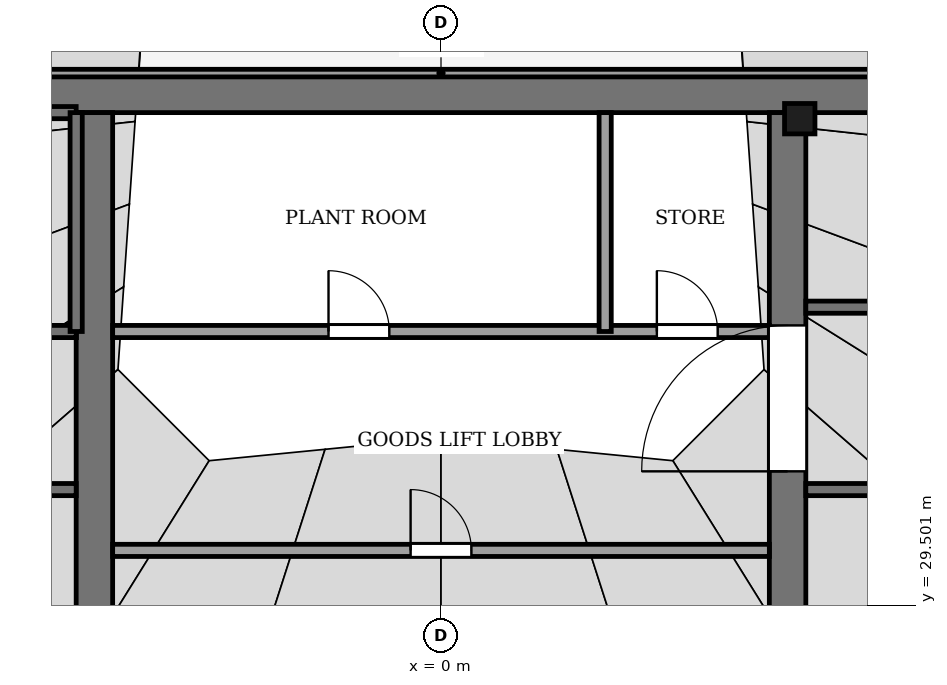
"""IFC4 building model, lengths in metres.
Left out: names, types, materials, properties, quantities, classifications, styles, units other than length and angle.
Written with IfcOpenShell. Run it as: python <this file> out.ifc"""

import sys

from ifc_helpers import new_model, si_unit, direction, frame, frame_2d, origin, origin_2d, place, context, subcontext, project, spatial, rectangle, extrude, element, fill, save


model = new_model("IFC4")
c1 = context("Model", 3, precision=1e-05, world=origin(), true_north=direction((0.0, 1.0)))
c2 = subcontext(c1, "Body", "Model", "MODEL_VIEW")
j1 = project(units=[si_unit("LENGTHUNIT", "METRE"), si_unit("PLANEANGLEUNIT", "RADIAN")], contexts=[c1])
p1 = place(None, origin())
s1 = spatial("IfcSite", under=j1, at=p1, CompositionType="ELEMENT")
p2 = place(p1, origin())
s2 = spatial("IfcBuilding", under=s1, at=p2, CompositionType="ELEMENT")
p3 = place(p2, frame((0.0, 0.0, 368.0)))
s3 = spatial("IfcBuildingStorey", under=s2, at=p3, CompositionType="ELEMENT", Elevation=368.0)
p4 = place(p3, frame((-13.2, 37.9, -0.15), z_axis=(0.0, 0.0, 1.0), x_axis=(1.0, 0.0, 0.0)))
e1 = element("IfcWall", 1, at=p4, inside=s3, PredefinedType="SHEAR", context=c2, shape_type="SweptSolid", body=[
    extrude(rectangle(XDim=26.4, YDim=0.6, at=frame_2d((13.2, 0.0))), origin(), (0.0, 0.0, 1.0), 3.45),
])
p5 = place(p3, frame((-5.7, 18.4, -0.15), z_axis=(0.0, 0.0, 1.0), x_axis=(0.0, 1.0, 0.0)))
e2 = element("IfcWall", 2, at=p5, inside=s3, PredefinedType="SHEAR", context=c2, shape_type="SweptSolid", body=[
    extrude(rectangle(XDim=19.2, YDim=0.6, at=frame_2d((9.6, 0.0))), origin(), (0.0, 0.0, 1.0), 3.45),
])
p6 = place(p5, frame((8.35, 0.0, 0.15)))
e3 = element("IfcOpeningElement", 3, at=p6, cuts=e2, PredefinedType="OPENING", context=c2, shape_type="SweptSolid", body=[
    extrude(rectangle(XDim=0.9, YDim=2.1, at=frame_2d((0.45, 1.05))), frame((0.0, 0.31, 0.0), z_axis=(0.0, -1.0, 0.0), x_axis=(1.0, 0.0, 0.0)), (0.0, 0.0, 1.0), 0.62),
])
p7 = place(p3, frame((5.7, 18.4, -0.15), z_axis=(0.0, 0.0, 1.0), x_axis=(0.0, 1.0, 0.0)))
e4 = element("IfcWall", 4, at=p7, inside=s3, PredefinedType="SHEAR", context=c2, shape_type="SweptSolid", body=[
    extrude(rectangle(XDim=19.2, YDim=0.6, at=frame_2d((9.6, 0.0))), origin(), (0.0, 0.0, 1.0), 3.45),
])
p8 = place(p7, frame((13.3, 0.0, 0.15)))
e5 = element("IfcOpeningElement", 5, at=p8, cuts=e4, PredefinedType="OPENING", context=c2, shape_type="SweptSolid", body=[
    extrude(rectangle(XDim=2.4, YDim=2.4, at=frame_2d((1.2, 1.2))), frame((0.0, 0.31, 0.0), z_axis=(0.0, -1.0, 0.0), x_axis=(1.0, 0.0, 0.0)), (0.0, 0.0, 1.0), 0.62),
])
p9 = place(p3, frame((5.9, 37.5, 3.5), z_axis=(0.0, 0.0, 1.0), x_axis=(1.0, 0.0, 0.0)))
e6 = element("IfcColumn", 6, at=p9, inside=s3, PredefinedType="COLUMN", context=c2, shape_type="SweptSolid", body=[
    extrude(rectangle(XDim=0.5, YDim=0.5, at=origin_2d()), origin(), (0.0, 0.0, 1.0), 0.8),
])
p10 = place(p3, frame((-5.4, 30.4, 0.0), z_axis=(0.0, 0.0, 1.0), x_axis=(1.0, 0.0, 0.0)))
e7 = element("IfcWall", 7, at=p10, inside=s3, PredefinedType="PARTITIONING", context=c2, shape_type="SweptSolid", body=[
    extrude(rectangle(XDim=10.8, YDim=0.2, at=frame_2d((5.4, 0.0))), origin(), (0.0, 0.0, 1.0), 3.3),
])
p11 = place(p10, frame((4.9, 0.0, 0.0)))
e8 = element("IfcOpeningElement", 8, at=p11, cuts=e7, PredefinedType="OPENING", context=c2, shape_type="SweptSolid", body=[
    extrude(rectangle(XDim=1.0, YDim=2.1, at=frame_2d((0.5, 1.05))), frame((0.0, 0.11, 0.0), z_axis=(0.0, -1.0, 0.0), x_axis=(1.0, 0.0, 0.0)), (0.0, 0.0, 1.0), 0.22),
])
p12 = place(p3, frame((-12.6, 31.4, 0.0), z_axis=(0.0, 0.0, 1.0), x_axis=(1.0, 0.0, 0.0)))
e9 = element("IfcWall", 9, at=p12, inside=s3, PredefinedType="PARTITIONING", context=c2, shape_type="SweptSolid", body=[
    extrude(rectangle(XDim=6.6, YDim=0.2, at=frame_2d((3.3, 0.0))), origin(), (0.0, 0.0, 1.0), 3.3),
])
p13 = place(p12, frame((1.0, 0.0, 0.0)))
e10 = element("IfcOpeningElement", 10, at=p13, cuts=e9, PredefinedType="OPENING", context=c2, shape_type="SweptSolid", body=[
    extrude(rectangle(XDim=1.2, YDim=2.2, at=frame_2d((0.6, 1.1))), frame((0.0, 0.11, 0.0), z_axis=(0.0, -1.0, 0.0), x_axis=(1.0, 0.0, 0.0)), (0.0, 0.0, 1.0), 0.22),
])
p14 = place(p3, frame((6.0, 31.4, 0.0), z_axis=(0.0, 0.0, 1.0), x_axis=(1.0, 0.0, 0.0)))
e11 = element("IfcWall", 11, at=p14, inside=s3, PredefinedType="PARTITIONING", context=c2, shape_type="SweptSolid", body=[
    extrude(rectangle(XDim=6.6, YDim=0.2, at=frame_2d((3.3, 0.0))), origin(), (0.0, 0.0, 1.0), 3.3),
])
p15 = place(p3, frame((-12.6, 34.0, 0.0), z_axis=(0.0, 0.0, 1.0), x_axis=(1.0, 0.0, 0.0)))
e12 = element("IfcWall", 12, at=p15, inside=s3, PredefinedType="PARTITIONING", context=c2, shape_type="SweptSolid", body=[
    extrude(rectangle(XDim=6.6, YDim=0.2, at=frame_2d((3.3, 0.0))), origin(), (0.0, 0.0, 1.0), 3.3),
])
p16 = place(p15, frame((4.7, 0.0, 0.0)))
e13 = element("IfcOpeningElement", 13, at=p16, cuts=e12, PredefinedType="OPENING", context=c2, shape_type="SweptSolid", body=[
    extrude(rectangle(XDim=1.4, YDim=2.2, at=frame_2d((0.7, 1.1))), frame((0.0, 0.11, 0.0), z_axis=(0.0, -1.0, 0.0), x_axis=(1.0, 0.0, 0.0)), (0.0, 0.0, 1.0), 0.22),
])
p17 = place(p15, frame((2.3, 0.0, 0.0)))
e14 = element("IfcOpeningElement", 14, at=p17, cuts=e12, PredefinedType="OPENING", context=c2, shape_type="SweptSolid", body=[
    extrude(rectangle(XDim=1.4, YDim=2.2, at=frame_2d((0.7, 1.1))), frame((0.0, 0.11, 0.0), z_axis=(0.0, -1.0, 0.0), x_axis=(1.0, 0.0, 0.0)), (0.0, 0.0, 1.0), 0.22),
])
p18 = place(p15, frame((0.45, 0.0, 0.0)))
e15 = element("IfcOpeningElement", 15, at=p18, cuts=e12, PredefinedType="OPENING", context=c2, shape_type="SweptSolid", body=[
    extrude(rectangle(XDim=0.9, YDim=2.1, at=frame_2d((0.45, 1.05))), frame((0.0, 0.11, 0.0), z_axis=(0.0, -1.0, 0.0), x_axis=(1.0, 0.0, 0.0)), (0.0, 0.0, 1.0), 0.22),
])
p19 = place(p3, frame((-5.4, 34.0, 0.0), z_axis=(0.0, 0.0, 1.0), x_axis=(1.0, 0.0, 0.0)))
e16 = element("IfcWall", 16, at=p19, inside=s3, PredefinedType="PARTITIONING", context=c2, shape_type="SweptSolid", body=[
    extrude(rectangle(XDim=10.8, YDim=0.2, at=frame_2d((5.4, 0.0))), origin(), (0.0, 0.0, 1.0), 3.3),
])
p20 = place(p19, frame((3.55, 0.0, 0.0)))
e17 = element("IfcOpeningElement", 17, at=p20, cuts=e16, PredefinedType="OPENING", context=c2, shape_type="SweptSolid", body=[
    extrude(rectangle(XDim=1.0, YDim=2.1, at=frame_2d((0.5, 1.05))), frame((0.0, 0.11, 0.0), z_axis=(0.0, -1.0, 0.0), x_axis=(1.0, 0.0, 0.0)), (0.0, 0.0, 1.0), 0.22),
])
p21 = place(p19, frame((8.95, 0.0, 0.0)))
e18 = element("IfcOpeningElement", 18, at=p21, cuts=e16, PredefinedType="OPENING", context=c2, shape_type="SweptSolid", body=[
    extrude(rectangle(XDim=1.0, YDim=2.1, at=frame_2d((0.5, 1.05))), frame((0.0, 0.11, 0.0), z_axis=(0.0, -1.0, 0.0), x_axis=(1.0, 0.0, 0.0)), (0.0, 0.0, 1.0), 0.22),
])
p22 = place(p3, frame((6.0, 34.4, 0.0), z_axis=(0.0, 0.0, 1.0), x_axis=(1.0, 0.0, 0.0)))
e19 = element("IfcWall", 19, at=p22, inside=s3, PredefinedType="PARTITIONING", context=c2, shape_type="SweptSolid", body=[
    extrude(rectangle(XDim=6.6, YDim=0.2, at=frame_2d((3.3, 0.0))), origin(), (0.0, 0.0, 1.0), 3.3),
])
p23 = place(p22, frame((4.8, 0.0, 0.0)))
e20 = element("IfcOpeningElement", 20, at=p23, cuts=e19, PredefinedType="OPENING", context=c2, shape_type="SweptSolid", body=[
    extrude(rectangle(XDim=1.2, YDim=2.2, at=frame_2d((0.6, 1.1))), frame((0.0, 0.11, 0.0), z_axis=(0.0, -1.0, 0.0), x_axis=(1.0, 0.0, 0.0)), (0.0, 0.0, 1.0), 0.22),
])
p24 = place(p3, frame((2.7, 34.0, 0.0), z_axis=(0.0, 0.0, 1.0), x_axis=(0.0, 1.0, 0.0)))
e21 = element("IfcWall", 21, at=p24, inside=s3, PredefinedType="PARTITIONING", context=c2, shape_type="SweptSolid", body=[
    extrude(rectangle(XDim=3.6, YDim=0.2, at=frame_2d((1.8, 0.0))), origin(), (0.0, 0.0, 1.0), 3.3),
])
for number, where, z_axis, x_axis in (
    (22, (-10.8, 34.0, 3.5), (0.0, 0.0, 1.0), (1.0, 0.0, 0.0)),
    (23, (-10.8, 37.6, 3.5), (0.0, 0.0, 1.0), (1.0, 0.0, 0.0)),
):
    element("IfcWall", number, at=place(p3, frame(where, z_axis=z_axis, x_axis=x_axis)), inside=s3, PredefinedType="PARTITIONING", context=c2, shape_type="SweptSolid", body=[
        extrude(rectangle(XDim=4.8, YDim=0.2, at=frame_2d((2.4, 0.0))), origin(), (0.0, 0.0, 1.0), 5.0),
    ])
p25 = place(p3, frame((-6.0, 34.0, 3.5), z_axis=(0.0, 0.0, 1.0), x_axis=(0.0, 1.0, 0.0)))
e24 = element("IfcWall", 24, at=p25, inside=s3, PredefinedType="PARTITIONING", context=c2, shape_type="SweptSolid", body=[
    extrude(rectangle(XDim=3.6, YDim=0.2, at=frame_2d((1.8, 0.0))), origin(), (0.0, 0.0, 1.0), 5.0),
])
p26 = place(p3, frame((13.2, 38.25, 0.0), z_axis=(0.0, 0.0, 1.0), x_axis=(-1.0, 0.0, 0.0)))
e25 = element("IfcWall", 25, at=p26, inside=s3, PredefinedType="PARTITIONING", context=c2, shape_type="SweptSolid", body=[
    extrude(rectangle(XDim=26.4, YDim=0.125, at=frame_2d((13.2, 0.0))), origin(), (0.0, 0.0, 1.0), 2.82),
])
p27 = place(p11, origin())
e26 = element("IfcDoor", 26, at=p27, inside=s3, OperationType="SINGLE_SWING_LEFT", PredefinedType="DOOR", context=c2, shape_type="SweptSolid", body=[
    extrude(rectangle(XDim=1.0, YDim=2.1, at=frame_2d((0.5, 1.05))), frame((0.0, 0.025, 0.0), z_axis=(0.0, -1.0, 0.0), x_axis=(1.0, 0.0, 0.0)), (0.0, 0.0, 1.0), 0.05),
])
fill(e8, e26)
p28 = place(p20, origin())
e27 = element("IfcDoor", 27, at=p28, inside=s3, OperationType="SINGLE_SWING_LEFT", PredefinedType="DOOR", context=c2, shape_type="SweptSolid", body=[
    extrude(rectangle(XDim=1.0, YDim=2.1, at=frame_2d((0.5, 1.05))), frame((0.0, 0.025, 0.0), z_axis=(0.0, -1.0, 0.0), x_axis=(1.0, 0.0, 0.0)), (0.0, 0.0, 1.0), 0.05),
])
fill(e17, e27)
p29 = place(p21, origin())
e28 = element("IfcDoor", 28, at=p29, inside=s3, OperationType="SINGLE_SWING_LEFT", PredefinedType="DOOR", context=c2, shape_type="SweptSolid", body=[
    extrude(rectangle(XDim=1.0, YDim=2.1, at=frame_2d((0.5, 1.05))), frame((0.0, 0.025, 0.0), z_axis=(0.0, -1.0, 0.0), x_axis=(1.0, 0.0, 0.0)), (0.0, 0.0, 1.0), 0.05),
])
fill(e18, e28)
p30 = place(p8, origin())
e29 = element("IfcDoor", 29, at=p30, inside=s3, OperationType="DOUBLE_DOOR_SINGLE_SWING", PredefinedType="DOOR", context=c2, shape_type="SweptSolid", body=[
    extrude(rectangle(XDim=2.4, YDim=2.4, at=frame_2d((1.2, 1.2))), frame((0.0, 0.025, 0.0), z_axis=(0.0, -1.0, 0.0), x_axis=(1.0, 0.0, 0.0)), (0.0, 0.0, 1.0), 0.05),
])
fill(e5, e29)
save(model, sys.argv[1])
